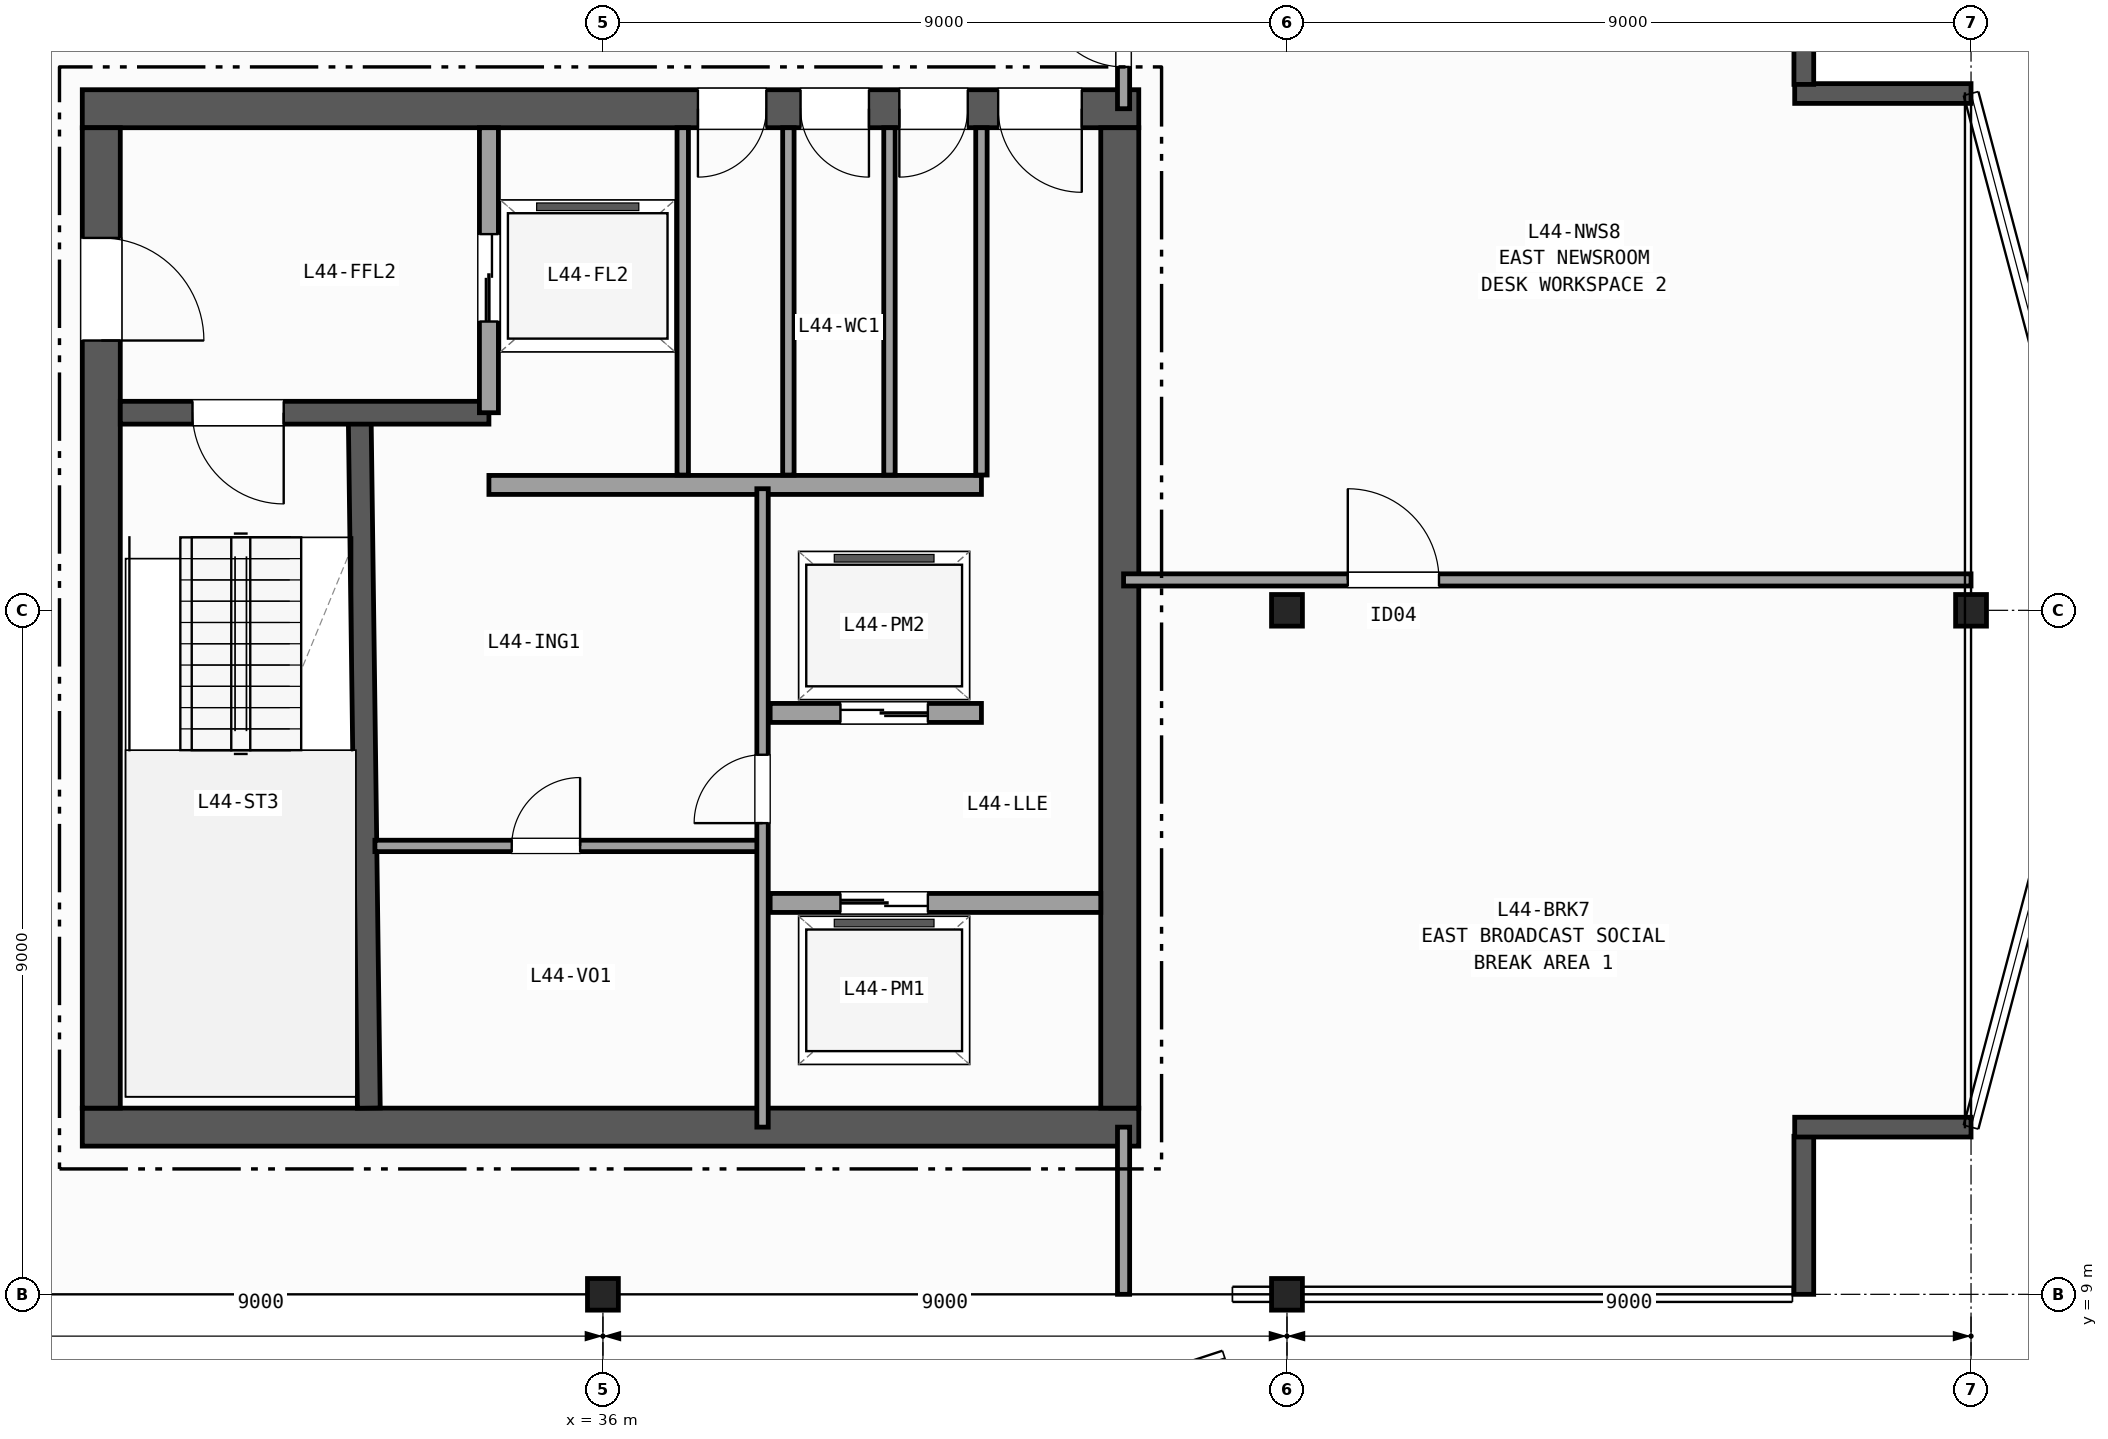
"""IFC4 building model, lengths in metres.
Left out: names, types, materials, properties, quantities, classifications, styles, units other than length and angle.
Written with IfcOpenShell. Run it as: python <this file> out.ifc"""

import sys

from ifc_helpers import new_model, si_unit, direction, frame, frame_2d, origin, origin_2d, place, context, subcontext, project, spatial, rectangle, i_section, extrude, element, fill, save


model = new_model("IFC4")
c1 = context("Model", 3, precision=1e-05, world=origin(), true_north=direction((0.0, 1.0)))
c2 = subcontext(c1, "Body", "Model", "MODEL_VIEW")
j1 = project(units=[si_unit("LENGTHUNIT", "METRE"), si_unit("PLANEANGLEUNIT", "RADIAN")], contexts=[c1])
p1 = place(None, origin())
s1 = spatial("IfcSite", under=j1, at=p1, CompositionType="ELEMENT")
p2 = place(p1, origin())
s2 = spatial("IfcBuilding", under=s1, at=p2, CompositionType="ELEMENT")
p3 = place(p2, frame((0.0, 0.0, 177.9)))
s3 = spatial("IfcBuildingStorey", under=s2, at=p3, CompositionType="ELEMENT", Elevation=177.9)
for number, where, z_axis, x_axis in (
    (1, (36.0, 9.0, 0.0), (0.0, 0.0, 1.0), (1.0, 0.0, 0.0)),
    (2, (45.0, 9.0, 0.0), (0.0, 0.0, 1.0), (1.0, 0.0, 0.0)),
    (3, (45.0, 18.0, 0.0), (0.0, 0.0, 1.0), (1.0, 0.0, 0.0)),
    (4, (54.0, 18.0, 0.0), (0.0, 0.0, 1.0), (1.0, 0.0, 0.0)),
):
    element("IfcColumn", number, at=place(p3, frame(where, z_axis=z_axis, x_axis=x_axis)), inside=s3, PredefinedType="COLUMN", context=c2, shape_type="SweptSolid", body=[
        extrude(i_section(OverallWidth=0.406, OverallDepth=0.416, WebThickness=0.03, FlangeThickness=0.048, FilletRadius=0.015, at=origin_2d()), origin(), (0.0, 0.0, 1.0), 3.7),
    ])
p4 = place(p3, frame((51.8, 9.0, 0.0), z_axis=(0.0, 0.0, 1.0), x_axis=(0.0, 1.0, 0.0)))
e5 = element("IfcWall", 5, at=p4, inside=s3, PredefinedType="SOLIDWALL", context=c2, shape_type="SweptSolid", body=[
    extrude(rectangle(XDim=2.08, YDim=0.26, at=frame_2d((1.04, 0.0))), origin(), (0.0, 0.0, 1.0), 3.42),
])
for number, where, z_axis, x_axis in (
    (6, (51.68, 11.2, 0.0), (0.0, 0.0, 1.0), (1.0, 0.0, 0.0)),
    (7, (54.0, 24.8, 0.0), (0.0, 0.0, 1.0), (-1.0, 0.0, 0.0)),
):
    element("IfcWall", number, at=place(p3, frame(where, z_axis=z_axis, x_axis=x_axis)), inside=s3, PredefinedType="SOLIDWALL", context=c2, shape_type="SweptSolid", body=[
        extrude(rectangle(XDim=2.32, YDim=0.26, at=frame_2d((1.16, 0.0))), origin(), (0.0, 0.0, 1.0), 3.42),
    ])
p5 = place(p3, frame((51.8, 24.92, 0.0), z_axis=(0.0, 0.0, 1.0), x_axis=(0.0, 1.0, 0.0)))
e8 = element("IfcWall", 8, at=p5, inside=s3, PredefinedType="SOLIDWALL", context=c2, shape_type="SweptSolid", body=[
    extrude(rectangle(XDim=2.08, YDim=0.26, at=frame_2d((1.04, 0.0))), origin(), (0.0, 0.0, 1.0), 3.42),
])
p6 = place(p3, frame((29.15, 11.2, 0.0), z_axis=(0.0, 0.0, 1.0), x_axis=(1.0, 0.0, 0.0)))
e9 = element("IfcWall", 9, at=p6, inside=s3, PredefinedType="SHEAR", context=c2, shape_type="SweptSolid", body=[
    extrude(rectangle(XDim=13.9, YDim=0.5, at=frame_2d((6.95, 0.0))), origin(), (0.0, 0.0, 1.0), 3.42),
])
p7 = place(p3, frame((43.05, 24.6, 0.0), z_axis=(0.0, 0.0, 1.0), x_axis=(-1.0, 0.0, 0.0)))
e10 = element("IfcWall", 10, at=p7, inside=s3, PredefinedType="SHEAR", context=c2, shape_type="SweptSolid", body=[
    extrude(rectangle(XDim=13.9, YDim=0.5, at=frame_2d((6.95, 0.0))), origin(), (0.0, 0.0, 1.0), 3.42),
])
p8 = place(p7, frame((0.75, 0.0, 0.0)))
e11 = element("IfcOpeningElement", 11, at=p8, cuts=e10, PredefinedType="OPENING", context=c2, shape_type="SweptSolid", body=[
    extrude(rectangle(XDim=1.1, YDim=2.15, at=frame_2d((0.55, 1.075))), frame((0.0, 0.26, 0.0), z_axis=(0.0, -1.0, 0.0), x_axis=(1.0, 0.0, 0.0)), (0.0, 0.0, 1.0), 0.52),
])
p9 = place(p7, frame((2.25, 0.0, 0.0)))
e12 = element("IfcOpeningElement", 12, at=p9, cuts=e10, PredefinedType="OPENING", context=c2, shape_type="SweptSolid", body=[
    extrude(rectangle(XDim=0.9, YDim=2.1, at=frame_2d((0.45, 1.05))), frame((0.0, 0.26, 0.0), z_axis=(0.0, -1.0, 0.0), x_axis=(1.0, 0.0, 0.0)), (0.0, 0.0, 1.0), 0.52),
])
p10 = place(p7, frame((3.55, 0.0, 0.0)))
e13 = element("IfcOpeningElement", 13, at=p10, cuts=e10, PredefinedType="OPENING", context=c2, shape_type="SweptSolid", body=[
    extrude(rectangle(XDim=0.9, YDim=2.1, at=frame_2d((0.45, 1.05))), frame((0.0, 0.26, 0.0), z_axis=(0.0, -1.0, 0.0), x_axis=(1.0, 0.0, 0.0)), (0.0, 0.0, 1.0), 0.52),
])
p11 = place(p7, frame((4.9, 0.0, 0.0)))
e14 = element("IfcOpeningElement", 14, at=p11, cuts=e10, PredefinedType="OPENING", context=c2, shape_type="SweptSolid", body=[
    extrude(rectangle(XDim=0.9, YDim=2.1, at=frame_2d((0.45, 1.05))), frame((0.0, 0.26, 0.0), z_axis=(0.0, -1.0, 0.0), x_axis=(1.0, 0.0, 0.0)), (0.0, 0.0, 1.0), 0.52),
])
p12 = place(p3, frame((29.4, 24.35, 0.0), z_axis=(0.0, 0.0, 1.0), x_axis=(0.0, -1.0, 0.0)))
e15 = element("IfcWall", 15, at=p12, inside=s3, PredefinedType="SHEAR", context=c2, shape_type="SweptSolid", body=[
    extrude(rectangle(XDim=12.9, YDim=0.5, at=frame_2d((6.45, 0.0))), origin(), (0.0, 0.0, 1.0), 3.42),
])
p13 = place(p12, frame((1.45, 0.0, 0.0)))
e16 = element("IfcOpeningElement", 16, at=p13, cuts=e15, PredefinedType="OPENING", context=c2, shape_type="SweptSolid", body=[
    extrude(rectangle(XDim=1.35, YDim=2.15, at=frame_2d((0.675, 1.075))), frame((0.0, 0.26, 0.0), z_axis=(0.0, -1.0, 0.0), x_axis=(1.0, 0.0, 0.0)), (0.0, 0.0, 1.0), 0.52),
])
p14 = place(p3, frame((42.8, 11.45, 0.0), z_axis=(0.0, 0.0, 1.0), x_axis=(0.0, 1.0, 0.0)))
e17 = element("IfcWall", 17, at=p14, inside=s3, PredefinedType="SHEAR", context=c2, shape_type="SweptSolid", body=[
    extrude(rectangle(XDim=12.9, YDim=0.5, at=frame_2d((6.45, 0.0))), origin(), (0.0, 0.0, 1.0), 3.42),
])
p15 = place(p3, frame((32.92, 11.45, 0.0), z_axis=(0.0, 0.0, 1.0), x_axis=(-0.013171578211, 0.999913251001, 0.0)))
e18 = element("IfcWall", 18, at=p15, inside=s3, PredefinedType="SHEAR", context=c2, shape_type="SweptSolid", body=[
    extrude(rectangle(XDim=9.101, YDim=0.3, at=frame_2d((4.55, 0.0))), origin(), (0.0, 0.0, 1.0), 3.42),
])
p16 = place(p3, frame((34.5, 20.6, 0.0), z_axis=(0.0, 0.0, 1.0), x_axis=(-1.0, 0.0, 0.0)))
e19 = element("IfcWall", 19, at=p16, inside=s3, PredefinedType="SHEAR", context=c2, shape_type="SweptSolid", body=[
    extrude(rectangle(XDim=4.85, YDim=0.3, at=frame_2d((2.425, 0.0))), origin(), (0.0, 0.0, 1.0), 3.42),
])
p17 = place(p16, frame((2.7, 0.0, 0.0)))
e20 = element("IfcOpeningElement", 20, at=p17, cuts=e19, PredefinedType="OPENING", context=c2, shape_type="SweptSolid", body=[
    extrude(rectangle(XDim=1.2, YDim=2.15, at=frame_2d((0.6, 1.075))), frame((0.0, 0.16, 0.0), z_axis=(0.0, -1.0, 0.0), x_axis=(1.0, 0.0, 0.0)), (0.0, 0.0, 1.0), 0.32),
])
p18 = place(p3, frame((34.5, 20.6, 0.0), z_axis=(0.0, 0.0, 1.0), x_axis=(0.0, 1.0, 0.0)))
e21 = element("IfcWall", 21, at=p18, inside=s3, PredefinedType="PARTITIONING", context=c2, shape_type="SweptSolid", body=[
    extrude(rectangle(XDim=3.75, YDim=0.25, at=frame_2d((1.875, 0.0))), origin(), (0.0, 0.0, 1.0), 3.42),
])
p19 = place(p18, frame((1.2, 0.0, 0.0)))
e22 = element("IfcOpeningElement", 22, at=p19, cuts=e21, PredefinedType="OPENING", context=c2, shape_type="SweptSolid", body=[
    extrude(rectangle(XDim=1.15, YDim=2.15, at=frame_2d((0.575, 1.075))), frame((0.0, 0.135, 0.0), z_axis=(0.0, -1.0, 0.0), x_axis=(1.0, 0.0, 0.0)), (0.0, 0.0, 1.0), 0.27),
])
p20 = place(p3, frame((34.5, 19.65, 0.0), z_axis=(0.0, 0.0, 1.0), x_axis=(1.0, 0.0, 0.0)))
e23 = element("IfcWall", 23, at=p20, inside=s3, PredefinedType="PARTITIONING", context=c2, shape_type="SweptSolid", body=[
    extrude(rectangle(XDim=6.48, YDim=0.25, at=frame_2d((3.24, 0.0))), origin(), (0.0, 0.0, 1.0), 3.42),
])
p21 = place(p3, frame((38.2, 14.15, 0.0), z_axis=(0.0, 0.0, 1.0), x_axis=(1.0, 0.0, 0.0)))
e24 = element("IfcWall", 24, at=p21, inside=s3, PredefinedType="PARTITIONING", context=c2, shape_type="SweptSolid", body=[
    extrude(rectangle(XDim=4.35, YDim=0.25, at=frame_2d((2.175, 0.0))), origin(), (0.0, 0.0, 1.0), 3.42),
])
p22 = place(p21, frame((0.925, 0.0, 0.0)))
e25 = element("IfcOpeningElement", 25, at=p22, cuts=e24, PredefinedType="OPENING", context=c2, shape_type="SweptSolid", body=[
    extrude(rectangle(XDim=1.15, YDim=2.15, at=frame_2d((0.575, 1.075))), frame((0.0, 0.135, 0.0), z_axis=(0.0, -1.0, 0.0), x_axis=(1.0, 0.0, 0.0)), (0.0, 0.0, 1.0), 0.27),
])
p23 = place(p3, frame((40.98, 16.65, 0.0), z_axis=(0.0, 0.0, 1.0), x_axis=(-1.0, 0.0, 0.0)))
e26 = element("IfcWall", 26, at=p23, inside=s3, PredefinedType="PARTITIONING", context=c2, shape_type="SweptSolid", body=[
    extrude(rectangle(XDim=2.78, YDim=0.25, at=frame_2d((1.39, 0.0))), origin(), (0.0, 0.0, 1.0), 3.42),
])
p24 = place(p23, frame((0.705, 0.0, 0.0)))
e27 = element("IfcOpeningElement", 27, at=p24, cuts=e26, PredefinedType="OPENING", context=c2, shape_type="SweptSolid", body=[
    extrude(rectangle(XDim=1.15, YDim=2.15, at=frame_2d((0.575, 1.075))), frame((0.0, 0.135, 0.0), z_axis=(0.0, -1.0, 0.0), x_axis=(1.0, 0.0, 0.0)), (0.0, 0.0, 1.0), 0.27),
])
p25 = place(p3, frame((33.0, 14.9, 0.0), z_axis=(0.0, 0.0, 1.0), x_axis=(1.0, 0.0, 0.0)))
e28 = element("IfcWall", 28, at=p25, inside=s3, PredefinedType="PARTITIONING", context=c2, shape_type="SweptSolid", body=[
    extrude(rectangle(XDim=5.1, YDim=0.15, at=frame_2d((2.55, 0.0))), origin(), (0.0, 0.0, 1.0), 3.42),
])
p26 = place(p25, frame((1.8, 0.0, 0.0)))
e29 = element("IfcOpeningElement", 29, at=p26, cuts=e28, PredefinedType="OPENING", context=c2, shape_type="SweptSolid", body=[
    extrude(rectangle(XDim=0.9, YDim=2.1, at=frame_2d((0.45, 1.05))), frame((0.0, 0.085, 0.0), z_axis=(0.0, -1.0, 0.0), x_axis=(1.0, 0.0, 0.0)), (0.0, 0.0, 1.0), 0.17),
])
p27 = place(p3, frame((38.1, 11.2, 0.0), z_axis=(0.0, 0.0, 1.0), x_axis=(0.0, 1.0, 0.0)))
e30 = element("IfcWall", 30, at=p27, inside=s3, PredefinedType="PARTITIONING", context=c2, shape_type="SweptSolid", body=[
    extrude(rectangle(XDim=8.4, YDim=0.15, at=frame_2d((4.2, 0.0))), origin(), (0.0, 0.0, 1.0), 3.42),
])
p28 = place(p27, frame((4.0, 0.0, 0.0)))
e31 = element("IfcOpeningElement", 31, at=p28, cuts=e30, PredefinedType="OPENING", context=c2, shape_type="SweptSolid", body=[
    extrude(rectangle(XDim=0.9, YDim=2.1, at=frame_2d((0.45, 1.05))), frame((0.0, 0.085, 0.0), z_axis=(0.0, -1.0, 0.0), x_axis=(1.0, 0.0, 0.0)), (0.0, 0.0, 1.0), 0.17),
])
for number, where, z_axis, x_axis in (
    (32, (37.05, 19.78, 0.0), (0.0, 0.0, 1.0), (0.0, 1.0, 0.0)),
    (33, (38.44, 19.78, 0.0), (0.0, 0.0, 1.0), (0.0, 1.0, 0.0)),
    (34, (39.77, 19.78, 0.0), (0.0, 0.0, 1.0), (0.0, 1.0, 0.0)),
    (35, (40.98, 19.78, 0.0), (0.0, 0.0, 1.0), (0.0, 1.0, 0.0)),
):
    element("IfcWall", number, at=place(p3, frame(where, z_axis=z_axis, x_axis=x_axis)), inside=s3, PredefinedType="PARTITIONING", context=c2, shape_type="SweptSolid", body=[
        extrude(rectangle(XDim=4.57, YDim=0.15, at=frame_2d((2.285, 0.0))), origin(), (0.0, 0.0, 1.0), 3.42),
    ])
p29 = place(p3, frame((42.85, 9.0, 0.0), z_axis=(0.0, 0.0, 1.0), x_axis=(0.0, 1.0, 0.0)))
e36 = element("IfcWall", 36, at=p29, inside=s3, PredefinedType="PARTITIONING", context=c2, shape_type="SweptSolid", body=[
    extrude(rectangle(XDim=2.2, YDim=0.16, at=frame_2d((1.1, 0.0))), origin(), (0.0, 0.0, 1.0), 2.634),
])
p30 = place(p3, frame((42.85, 24.6, 0.0), z_axis=(0.0, 0.0, 1.0), x_axis=(0.0, 1.0, 0.0)))
e37 = element("IfcWall", 37, at=p30, inside=s3, PredefinedType="PARTITIONING", context=c2, shape_type="SweptSolid", body=[
    extrude(rectangle(XDim=2.4, YDim=0.16, at=frame_2d((1.2, 0.0))), origin(), (0.0, 0.0, 1.0), 2.634),
])
p31 = place(p30, frame((0.55, 0.0, 0.0)))
e38 = element("IfcOpeningElement", 38, at=p31, cuts=e37, PredefinedType="OPENING", context=c2, shape_type="SweptSolid", body=[
    extrude(rectangle(XDim=1.05, YDim=2.15, at=frame_2d((0.525, 1.075))), frame((0.0, 0.09, 0.0), z_axis=(0.0, -1.0, 0.0), x_axis=(1.0, 0.0, 0.0)), (0.0, 0.0, 1.0), 0.18),
])
p32 = place(p3, frame((42.85, 18.4, 0.0), z_axis=(0.0, 0.0, 1.0), x_axis=(1.0, 0.0, 0.0)))
e39 = element("IfcWall", 39, at=p32, inside=s3, PredefinedType="PARTITIONING", context=c2, shape_type="SweptSolid", body=[
    extrude(rectangle(XDim=11.15, YDim=0.16, at=frame_2d((5.575, 0.0))), origin(), (0.0, 0.0, 1.0), 3.42),
])
p33 = place(p32, frame((2.95, 0.0, 0.0)))
e40 = element("IfcOpeningElement", 40, at=p33, cuts=e39, PredefinedType="OPENING", context=c2, shape_type="SweptSolid", body=[
    extrude(rectangle(XDim=1.2, YDim=2.15, at=frame_2d((0.6, 1.075))), frame((0.0, 0.09, 0.0), z_axis=(0.0, -1.0, 0.0), x_axis=(1.0, 0.0, 0.0)), (0.0, 0.0, 1.0), 0.18),
])
p34 = place(p17, origin())
e41 = element("IfcDoor", 41, at=p34, inside=s3, OperationType="SINGLE_SWING_LEFT", PredefinedType="DOOR", context=c2, shape_type="SweptSolid", body=[
    extrude(rectangle(XDim=1.2, YDim=2.15, at=frame_2d((0.6, 1.075))), frame((0.0, 0.025, 0.0), z_axis=(0.0, -1.0, 0.0), x_axis=(1.0, 0.0, 0.0)), (0.0, 0.0, 1.0), 0.05),
])
fill(e20, e41)
p35 = place(p13, origin())
e42 = element("IfcDoor", 42, at=p35, inside=s3, OperationType="SINGLE_SWING_RIGHT", PredefinedType="DOOR", context=c2, shape_type="SweptSolid", body=[
    extrude(rectangle(XDim=1.35, YDim=2.15, at=frame_2d((0.675, 1.075))), frame((0.0, 0.025, 0.0), z_axis=(0.0, -1.0, 0.0), x_axis=(1.0, 0.0, 0.0)), (0.0, 0.0, 1.0), 0.05),
])
fill(e16, e42)
p36 = place(p8, origin())
e43 = element("IfcDoor", 43, at=p36, inside=s3, OperationType="SINGLE_SWING_LEFT", PredefinedType="DOOR", context=c2, shape_type="SweptSolid", body=[
    extrude(rectangle(XDim=1.1, YDim=2.15, at=frame_2d((0.55, 1.075))), frame((0.0, 0.025, 0.0), z_axis=(0.0, -1.0, 0.0), x_axis=(1.0, 0.0, 0.0)), (0.0, 0.0, 1.0), 0.05),
])
fill(e11, e43)
p37 = place(p9, origin())
e44 = element("IfcDoor", 44, at=p37, inside=s3, OperationType="SINGLE_SWING_RIGHT", PredefinedType="DOOR", context=c2, shape_type="SweptSolid", body=[
    extrude(rectangle(XDim=0.9, YDim=2.1, at=frame_2d((0.45, 1.05))), frame((0.0, 0.025, 0.0), z_axis=(0.0, -1.0, 0.0), x_axis=(1.0, 0.0, 0.0)), (0.0, 0.0, 1.0), 0.05),
])
fill(e12, e44)
p38 = place(p10, origin())
e45 = element("IfcDoor", 45, at=p38, inside=s3, OperationType="SINGLE_SWING_LEFT", PredefinedType="DOOR", context=c2, shape_type="SweptSolid", body=[
    extrude(rectangle(XDim=0.9, YDim=2.1, at=frame_2d((0.45, 1.05))), frame((0.0, 0.025, 0.0), z_axis=(0.0, -1.0, 0.0), x_axis=(1.0, 0.0, 0.0)), (0.0, 0.0, 1.0), 0.05),
])
fill(e13, e45)
p39 = place(p11, origin())
e46 = element("IfcDoor", 46, at=p39, inside=s3, OperationType="SINGLE_SWING_RIGHT", PredefinedType="DOOR", context=c2, shape_type="SweptSolid", body=[
    extrude(rectangle(XDim=0.9, YDim=2.1, at=frame_2d((0.45, 1.05))), frame((0.0, 0.025, 0.0), z_axis=(0.0, -1.0, 0.0), x_axis=(1.0, 0.0, 0.0)), (0.0, 0.0, 1.0), 0.05),
])
fill(e14, e46)
p40 = place(p19, origin())
e47 = element("IfcDoor", 47, at=p40, inside=s3, OperationType="DOUBLE_DOOR_SLIDING", PredefinedType="DOOR", context=c2, shape_type="SweptSolid", body=[
    extrude(rectangle(XDim=1.15, YDim=2.15, at=frame_2d((0.575, 1.075))), frame((0.0, 0.025, 0.0), z_axis=(0.0, -1.0, 0.0), x_axis=(1.0, 0.0, 0.0)), (0.0, 0.0, 1.0), 0.05),
])
fill(e22, e47)
p41 = place(p22, origin())
e48 = element("IfcDoor", 48, at=p41, inside=s3, OperationType="DOUBLE_DOOR_SLIDING", PredefinedType="DOOR", context=c2, shape_type="SweptSolid", body=[
    extrude(rectangle(XDim=1.15, YDim=2.15, at=frame_2d((0.575, 1.075))), frame((0.0, 0.025, 0.0), z_axis=(0.0, -1.0, 0.0), x_axis=(1.0, 0.0, 0.0)), (0.0, 0.0, 1.0), 0.05),
])
fill(e25, e48)
p42 = place(p24, origin())
e49 = element("IfcDoor", 49, at=p42, inside=s3, OperationType="DOUBLE_DOOR_SLIDING", PredefinedType="DOOR", context=c2, shape_type="SweptSolid", body=[
    extrude(rectangle(XDim=1.15, YDim=2.15, at=frame_2d((0.575, 1.075))), frame((0.0, 0.025, 0.0), z_axis=(0.0, -1.0, 0.0), x_axis=(1.0, 0.0, 0.0)), (0.0, 0.0, 1.0), 0.05),
])
fill(e27, e49)
p43 = place(p28, origin())
e50 = element("IfcDoor", 50, at=p43, inside=s3, OperationType="SINGLE_SWING_LEFT", PredefinedType="DOOR", context=c2, shape_type="SweptSolid", body=[
    extrude(rectangle(XDim=0.9, YDim=2.1, at=frame_2d((0.45, 1.05))), frame((0.0, 0.025, 0.0), z_axis=(0.0, -1.0, 0.0), x_axis=(1.0, 0.0, 0.0)), (0.0, 0.0, 1.0), 0.05),
])
fill(e31, e50)
p44 = place(p26, origin())
e51 = element("IfcDoor", 51, at=p44, inside=s3, OperationType="SINGLE_SWING_RIGHT", PredefinedType="DOOR", context=c2, shape_type="SweptSolid", body=[
    extrude(rectangle(XDim=0.9, YDim=2.1, at=frame_2d((0.45, 1.05))), frame((0.0, 0.025, 0.0), z_axis=(0.0, -1.0, 0.0), x_axis=(1.0, 0.0, 0.0)), (0.0, 0.0, 1.0), 0.05),
])
fill(e29, e51)
p45 = place(p31, origin())
e52 = element("IfcDoor", 52, at=p45, inside=s3, OperationType="SINGLE_SWING_RIGHT", PredefinedType="DOOR", context=c2, shape_type="SweptSolid", body=[
    extrude(rectangle(XDim=1.05, YDim=2.15, at=frame_2d((0.525, 1.075))), frame((0.0, 0.025, 0.0), z_axis=(0.0, -1.0, 0.0), x_axis=(1.0, 0.0, 0.0)), (0.0, 0.0, 1.0), 0.05),
])
fill(e38, e52)
p46 = place(p33, origin())
e53 = element("IfcDoor", 53, at=p46, inside=s3, OperationType="SINGLE_SWING_LEFT", PredefinedType="DOOR", context=c2, shape_type="SweptSolid", body=[
    extrude(rectangle(XDim=1.2, YDim=2.15, at=frame_2d((0.6, 1.075))), frame((0.0, 0.025, 0.0), z_axis=(0.0, -1.0, 0.0), x_axis=(1.0, 0.0, 0.0)), (0.0, 0.0, 1.0), 0.05),
])
fill(e40, e53)
save(model, sys.argv[1])
